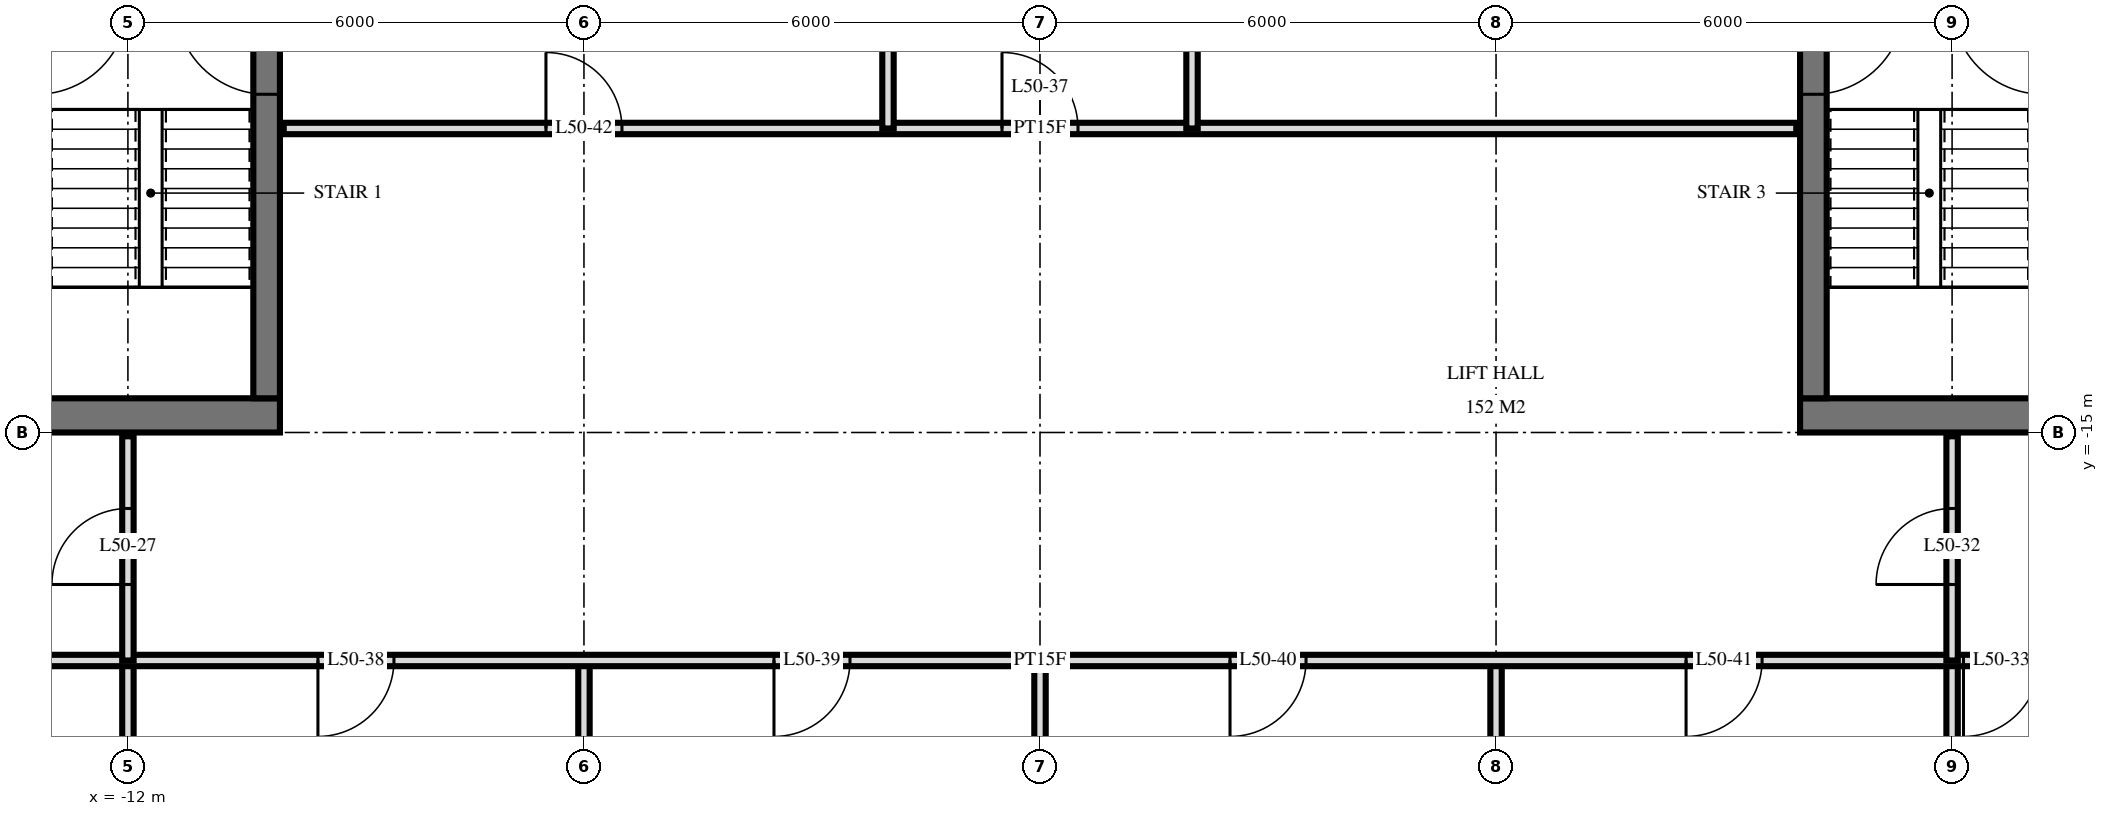
"""IFC4 building model, lengths in metres.
Left out: names, types, materials, properties, quantities, classifications, styles, units other than length and angle.
Written with IfcOpenShell. Run it as: python <this file> out.ifc"""

import sys

from ifc_helpers import new_model, si_unit, direction, frame, frame_2d, origin, place, context, subcontext, project, spatial, rectangle, extrude, element, fill, save


model = new_model("IFC4")
c1 = context("Model", 3, precision=1e-05, world=origin(), true_north=direction((0.0, 1.0)))
c2 = subcontext(c1, "Body", "Model", "MODEL_VIEW")
j1 = project(units=[si_unit("LENGTHUNIT", "METRE"), si_unit("PLANEANGLEUNIT", "RADIAN")], contexts=[c1])
p1 = place(None, origin())
s1 = spatial("IfcSite", under=j1, at=p1, CompositionType="ELEMENT")
p2 = place(p1, origin())
s2 = spatial("IfcBuilding", under=s1, at=p2, CompositionType="ELEMENT")
p3 = place(p2, frame((0.0, 0.0, 194.1)))
s3 = spatial("IfcBuildingStorey", under=s2, at=p3, CompositionType="ELEMENT", Elevation=194.1)
p4 = place(p3, frame((-24.5, -14.775, 0.0), z_axis=(0.0, 0.0, 1.0), x_axis=(1.0, 0.0, 0.0)))
e1 = element("IfcWall", 1, at=p4, inside=s3, PredefinedType="SHEAR", context=c2, shape_type="SweptSolid", body=[
    extrude(rectangle(XDim=14.5, YDim=0.45, at=frame_2d((7.25, 0.0))), origin(), (0.0, 0.0, 1.0), 3.5),
])
p5 = place(p4, frame((6.2, 0.0, 0.0)))
e2 = element("IfcOpeningElement", 2, at=p5, cuts=e1, PredefinedType="OPENING", context=c2, shape_type="SweptSolid", body=[
    extrude(rectangle(XDim=1.2, YDim=2.1, at=frame_2d((0.6, 1.05))), frame((0.0, 0.235, 0.0), z_axis=(0.0, -1.0, 0.0), x_axis=(1.0, 0.0, 0.0)), (0.0, 0.0, 1.0), 0.47),
])
p6 = place(p4, frame((9.25, 0.0, 0.0)))
e3 = element("IfcOpeningElement", 3, at=p6, cuts=e1, PredefinedType="OPENING", context=c2, shape_type="SweptSolid", body=[
    extrude(rectangle(XDim=1.1, YDim=2.1, at=frame_2d((0.55, 1.05))), frame((0.0, 0.235, 0.0), z_axis=(0.0, -1.0, 0.0), x_axis=(1.0, 0.0, 0.0)), (0.0, 0.0, 1.0), 0.47),
])
p7 = place(p4, frame((3.5, 0.0, 0.0)))
e4 = element("IfcOpeningElement", 4, at=p7, cuts=e1, PredefinedType="OPENING", context=c2, shape_type="SweptSolid", body=[
    extrude(rectangle(XDim=0.9, YDim=2.1, at=frame_2d((0.45, 1.05))), frame((0.0, 0.235, 0.0), z_axis=(0.0, -1.0, 0.0), x_axis=(1.0, 0.0, 0.0)), (0.0, 0.0, 1.0), 0.47),
])
p8 = place(p4, frame((1.05, 0.0, 0.0)))
e5 = element("IfcOpeningElement", 5, at=p8, cuts=e1, PredefinedType="OPENING", context=c2, shape_type="SweptSolid", body=[
    extrude(rectangle(XDim=1.0, YDim=2.1, at=frame_2d((0.5, 1.05))), frame((0.0, 0.235, 0.0), z_axis=(0.0, -1.0, 0.0), x_axis=(1.0, 0.0, 0.0)), (0.0, 0.0, 1.0), 0.47),
])
p9 = place(p3, frame((-10.175, -14.55, 0.0), z_axis=(0.0, 0.0, 1.0), x_axis=(0.0, 1.0, 0.0)))
e6 = element("IfcWall", 6, at=p9, inside=s3, PredefinedType="SHEAR", context=c2, shape_type="SweptSolid", body=[
    extrude(rectangle(XDim=14.1, YDim=0.35, at=frame_2d((7.05, 0.0))), origin(), (0.0, 0.0, 1.0), 3.5),
])
p10 = place(p9, frame((8.4, 0.0, 0.0)))
e7 = element("IfcOpeningElement", 7, at=p10, cuts=e6, PredefinedType="OPENING", context=c2, shape_type="SweptSolid", body=[
    extrude(rectangle(XDim=1.4, YDim=2.4, at=frame_2d((0.7, 1.2))), frame((0.0, 0.185, 0.0), z_axis=(0.0, -1.0, 0.0), x_axis=(1.0, 0.0, 0.0)), (0.0, 0.0, 1.0), 0.37),
])
p11 = place(p9, frame((10.0, 0.0, 0.0)))
e8 = element("IfcOpeningElement", 8, at=p11, cuts=e6, PredefinedType="OPENING", context=c2, shape_type="SweptSolid", body=[
    extrude(rectangle(XDim=1.4, YDim=2.4, at=frame_2d((0.7, 1.2))), frame((0.0, 0.185, 0.0), z_axis=(0.0, -1.0, 0.0), x_axis=(1.0, 0.0, 0.0)), (0.0, 0.0, 1.0), 0.37),
])
p12 = place(p9, frame((4.0, 0.0, 0.0)))
e9 = element("IfcOpeningElement", 9, at=p12, cuts=e6, PredefinedType="OPENING", context=c2, shape_type="SweptSolid", body=[
    extrude(rectangle(XDim=1.2, YDim=2.1, at=frame_2d((0.6, 1.05))), frame((0.0, 0.185, 0.0), z_axis=(0.0, -1.0, 0.0), x_axis=(1.0, 0.0, 0.0)), (0.0, 0.0, 1.0), 0.37),
])
p13 = place(p3, frame((10.0, -14.775, 0.0), z_axis=(0.0, 0.0, 1.0), x_axis=(1.0, 0.0, 0.0)))
e10 = element("IfcWall", 10, at=p13, inside=s3, PredefinedType="SHEAR", context=c2, shape_type="SweptSolid", body=[
    extrude(rectangle(XDim=14.5, YDim=0.45, at=frame_2d((7.25, 0.0))), origin(), (0.0, 0.0, 1.0), 3.5),
])
p14 = place(p13, frame((7.1, 0.0, 0.0)))
e11 = element("IfcOpeningElement", 11, at=p14, cuts=e10, PredefinedType="OPENING", context=c2, shape_type="SweptSolid", body=[
    extrude(rectangle(XDim=1.2, YDim=2.1, at=frame_2d((0.6, 1.05))), frame((0.0, 0.235, 0.0), z_axis=(0.0, -1.0, 0.0), x_axis=(1.0, 0.0, 0.0)), (0.0, 0.0, 1.0), 0.47),
])
p15 = place(p13, frame((4.15, 0.0, 0.0)))
e12 = element("IfcOpeningElement", 12, at=p15, cuts=e10, PredefinedType="OPENING", context=c2, shape_type="SweptSolid", body=[
    extrude(rectangle(XDim=1.1, YDim=2.1, at=frame_2d((0.55, 1.05))), frame((0.0, 0.235, 0.0), z_axis=(0.0, -1.0, 0.0), x_axis=(1.0, 0.0, 0.0)), (0.0, 0.0, 1.0), 0.47),
])
p16 = place(p13, frame((10.1, 0.0, 0.0)))
e13 = element("IfcOpeningElement", 13, at=p16, cuts=e10, PredefinedType="OPENING", context=c2, shape_type="SweptSolid", body=[
    extrude(rectangle(XDim=0.9, YDim=2.1, at=frame_2d((0.45, 1.05))), frame((0.0, 0.235, 0.0), z_axis=(0.0, -1.0, 0.0), x_axis=(1.0, 0.0, 0.0)), (0.0, 0.0, 1.0), 0.47),
])
p17 = place(p13, frame((12.45, 0.0, 0.0)))
e14 = element("IfcOpeningElement", 14, at=p17, cuts=e10, PredefinedType="OPENING", context=c2, shape_type="SweptSolid", body=[
    extrude(rectangle(XDim=1.0, YDim=2.1, at=frame_2d((0.5, 1.05))), frame((0.0, 0.235, 0.0), z_axis=(0.0, -1.0, 0.0), x_axis=(1.0, 0.0, 0.0)), (0.0, 0.0, 1.0), 0.47),
])
p18 = place(p3, frame((10.175, -14.55, 0.0), z_axis=(0.0, 0.0, 1.0), x_axis=(0.0, 1.0, 0.0)))
e15 = element("IfcWall", 15, at=p18, inside=s3, PredefinedType="SHEAR", context=c2, shape_type="SweptSolid", body=[
    extrude(rectangle(XDim=14.1, YDim=0.35, at=frame_2d((7.05, 0.0))), origin(), (0.0, 0.0, 1.0), 3.5),
])
p19 = place(p18, frame((8.4, 0.0, 0.0)))
e16 = element("IfcOpeningElement", 16, at=p19, cuts=e15, PredefinedType="OPENING", context=c2, shape_type="SweptSolid", body=[
    extrude(rectangle(XDim=1.4, YDim=2.4, at=frame_2d((0.7, 1.2))), frame((0.0, 0.185, 0.0), z_axis=(0.0, -1.0, 0.0), x_axis=(1.0, 0.0, 0.0)), (0.0, 0.0, 1.0), 0.37),
])
p20 = place(p18, frame((10.0, 0.0, 0.0)))
e17 = element("IfcOpeningElement", 17, at=p20, cuts=e15, PredefinedType="OPENING", context=c2, shape_type="SweptSolid", body=[
    extrude(rectangle(XDim=1.4, YDim=2.4, at=frame_2d((0.7, 1.2))), frame((0.0, 0.185, 0.0), z_axis=(0.0, -1.0, 0.0), x_axis=(1.0, 0.0, 0.0)), (0.0, 0.0, 1.0), 0.37),
])
p21 = place(p18, frame((4.0, 0.0, 0.0)))
e18 = element("IfcOpeningElement", 18, at=p21, cuts=e15, PredefinedType="OPENING", context=c2, shape_type="SweptSolid", body=[
    extrude(rectangle(XDim=1.2, YDim=2.1, at=frame_2d((0.6, 1.05))), frame((0.0, 0.185, 0.0), z_axis=(0.0, -1.0, 0.0), x_axis=(1.0, 0.0, 0.0)), (0.0, 0.0, 1.0), 0.37),
])
p22 = place(p3, frame((12.0, -18.0, 0.0), z_axis=(0.0, 0.0, 1.0), x_axis=(0.0, 1.0, 0.0)))
e19 = element("IfcWall", 19, at=p22, inside=s3, PredefinedType="PARTITIONING", context=c2, shape_type="SweptSolid", body=[
    extrude(rectangle(XDim=2.95, YDim=0.15, at=frame_2d((1.475, 0.0))), origin(), (0.0, 0.0, 1.0), 3.22),
])
p23 = place(p22, frame((1.0, 0.0, 0.0)))
e20 = element("IfcOpeningElement", 20, at=p23, cuts=e19, PredefinedType="OPENING", context=c2, shape_type="SweptSolid", body=[
    extrude(rectangle(XDim=1.0, YDim=2.1, at=frame_2d((0.5, 1.05))), frame((0.0, 0.085, 0.0), z_axis=(0.0, -1.0, 0.0), x_axis=(1.0, 0.0, 0.0)), (0.0, 0.0, 1.0), 0.17),
])
for number, where, z_axis, x_axis in (
    (21, (12.0, -29.22, 0.0), (0.0, 0.0, 1.0), (0.0, 1.0, 0.0)),
    (22, (6.0, -29.22, 0.0), (0.0, 0.0, 1.0), (0.0, 1.0, 0.0)),
):
    element("IfcWall", number, at=place(p3, frame(where, z_axis=z_axis, x_axis=x_axis)), inside=s3, PredefinedType="PARTITIONING", context=c2, shape_type="SweptSolid", body=[
        extrude(rectangle(XDim=11.22, YDim=0.15, at=frame_2d((5.61, 0.0))), origin(), (0.0, 0.0, 1.0), 3.22),
    ])
p24 = place(p3, frame((2.0, -11.0, 0.0), z_axis=(0.0, 0.0, 1.0), x_axis=(0.0, 1.0, 0.0)))
e23 = element("IfcWall", 23, at=p24, inside=s3, PredefinedType="PARTITIONING", context=c2, shape_type="SweptSolid", body=[
    extrude(rectangle(XDim=4.0, YDim=0.15, at=frame_2d((2.0, 0.0))), origin(), (0.0, 0.0, 1.0), 3.22),
])
p25 = place(p3, frame((0.0, -29.22, 0.0), z_axis=(0.0, 0.0, 1.0), x_axis=(0.0, 1.0, 0.0)))
e24 = element("IfcWall", 24, at=p25, inside=s3, PredefinedType="PARTITIONING", context=c2, shape_type="SweptSolid", body=[
    extrude(rectangle(XDim=11.22, YDim=0.15, at=frame_2d((5.61, 0.0))), origin(), (0.0, 0.0, 1.0), 3.22),
])
p26 = place(p3, frame((-2.0, -11.0, 0.0), z_axis=(0.0, 0.0, 1.0), x_axis=(0.0, 1.0, 0.0)))
e25 = element("IfcWall", 25, at=p26, inside=s3, PredefinedType="PARTITIONING", context=c2, shape_type="SweptSolid", body=[
    extrude(rectangle(XDim=4.0, YDim=0.15, at=frame_2d((2.0, 0.0))), origin(), (0.0, 0.0, 1.0), 3.22),
])
p27 = place(p3, frame((-6.0, -29.22, 0.0), z_axis=(0.0, 0.0, 1.0), x_axis=(0.0, 1.0, 0.0)))
e26 = element("IfcWall", 26, at=p27, inside=s3, PredefinedType="PARTITIONING", context=c2, shape_type="SweptSolid", body=[
    extrude(rectangle(XDim=11.22, YDim=0.15, at=frame_2d((5.61, 0.0))), origin(), (0.0, 0.0, 1.0), 3.22),
])
p28 = place(p3, frame((-12.0, -18.0, 0.0), z_axis=(0.0, 0.0, 1.0), x_axis=(0.0, 1.0, 0.0)))
e27 = element("IfcWall", 27, at=p28, inside=s3, PredefinedType="PARTITIONING", context=c2, shape_type="SweptSolid", body=[
    extrude(rectangle(XDim=2.95, YDim=0.15, at=frame_2d((1.475, 0.0))), origin(), (0.0, 0.0, 1.0), 3.22),
])
p29 = place(p28, frame((1.0, 0.0, 0.0)))
e28 = element("IfcOpeningElement", 28, at=p29, cuts=e27, PredefinedType="OPENING", context=c2, shape_type="SweptSolid", body=[
    extrude(rectangle(XDim=1.0, YDim=2.1, at=frame_2d((0.5, 1.05))), frame((0.0, 0.085, 0.0), z_axis=(0.0, -1.0, 0.0), x_axis=(1.0, 0.0, 0.0)), (0.0, 0.0, 1.0), 0.17),
])
p30 = place(p3, frame((-12.0, -29.22, 0.0), z_axis=(0.0, 0.0, 1.0), x_axis=(0.0, 1.0, 0.0)))
e29 = element("IfcWall", 29, at=p30, inside=s3, PredefinedType="PARTITIONING", context=c2, shape_type="SweptSolid", body=[
    extrude(rectangle(XDim=11.22, YDim=0.15, at=frame_2d((5.61, 0.0))), origin(), (0.0, 0.0, 1.0), 3.22),
])
p31 = place(p3, frame((-26.82, -18.0, 0.0), z_axis=(0.0, 0.0, 1.0), x_axis=(1.0, 0.0, 0.0)))
e30 = element("IfcWall", 30, at=p31, inside=s3, PredefinedType="PARTITIONING", context=c2, shape_type="SweptSolid", body=[
    extrude(rectangle(XDim=53.64, YDim=0.15, at=frame_2d((26.82, 0.0))), origin(), (0.0, 0.0, 1.0), 3.22),
])
p32 = place(p31, frame((11.32, 0.0, 0.0)))
e31 = element("IfcOpeningElement", 31, at=p32, cuts=e30, PredefinedType="OPENING", context=c2, shape_type="SweptSolid", body=[
    extrude(rectangle(XDim=1.0, YDim=2.1, at=frame_2d((0.5, 1.05))), frame((0.0, 0.085, 0.0), z_axis=(0.0, -1.0, 0.0), x_axis=(1.0, 0.0, 0.0)), (0.0, 0.0, 1.0), 0.17),
])
p33 = place(p31, frame((3.22, 0.0, 0.0)))
e32 = element("IfcOpeningElement", 32, at=p33, cuts=e30, PredefinedType="OPENING", context=c2, shape_type="SweptSolid", body=[
    extrude(rectangle(XDim=1.0, YDim=2.1, at=frame_2d((0.5, 1.05))), frame((0.0, 0.085, 0.0), z_axis=(0.0, -1.0, 0.0), x_axis=(1.0, 0.0, 0.0)), (0.0, 0.0, 1.0), 0.17),
])
p34 = place(p31, frame((5.02, 0.0, 0.0)))
e33 = element("IfcOpeningElement", 33, at=p34, cuts=e30, PredefinedType="OPENING", context=c2, shape_type="SweptSolid", body=[
    extrude(rectangle(XDim=1.0, YDim=2.1, at=frame_2d((0.5, 1.05))), frame((0.0, 0.085, 0.0), z_axis=(0.0, -1.0, 0.0), x_axis=(1.0, 0.0, 0.0)), (0.0, 0.0, 1.0), 0.17),
])
p35 = place(p31, frame((38.97, 0.0, 0.0)))
e34 = element("IfcOpeningElement", 34, at=p35, cuts=e30, PredefinedType="OPENING", context=c2, shape_type="SweptSolid", body=[
    extrude(rectangle(XDim=1.0, YDim=2.1, at=frame_2d((0.5, 1.05))), frame((0.0, 0.085, 0.0), z_axis=(0.0, -1.0, 0.0), x_axis=(1.0, 0.0, 0.0)), (0.0, 0.0, 1.0), 0.17),
])
p36 = place(p31, frame((48.72, 0.0, 0.0)))
e35 = element("IfcOpeningElement", 35, at=p36, cuts=e30, PredefinedType="OPENING", context=c2, shape_type="SweptSolid", body=[
    extrude(rectangle(XDim=1.0, YDim=2.1, at=frame_2d((0.5, 1.05))), frame((0.0, 0.085, 0.0), z_axis=(0.0, -1.0, 0.0), x_axis=(1.0, 0.0, 0.0)), (0.0, 0.0, 1.0), 0.17),
])
p37 = place(p31, frame((46.92, 0.0, 0.0)))
e36 = element("IfcOpeningElement", 36, at=p37, cuts=e30, PredefinedType="OPENING", context=c2, shape_type="SweptSolid", body=[
    extrude(rectangle(XDim=1.0, YDim=2.1, at=frame_2d((0.5, 1.05))), frame((0.0, 0.085, 0.0), z_axis=(0.0, -1.0, 0.0), x_axis=(1.0, 0.0, 0.0)), (0.0, 0.0, 1.0), 0.17),
])
p38 = place(p31, frame((17.32, 0.0, 0.0)))
e37 = element("IfcOpeningElement", 37, at=p38, cuts=e30, PredefinedType="OPENING", context=c2, shape_type="SweptSolid", body=[
    extrude(rectangle(XDim=1.0, YDim=2.1, at=frame_2d((0.5, 1.05))), frame((0.0, 0.085, 0.0), z_axis=(0.0, -1.0, 0.0), x_axis=(1.0, 0.0, 0.0)), (0.0, 0.0, 1.0), 0.17),
])
p39 = place(p31, frame((23.32, 0.0, 0.0)))
e38 = element("IfcOpeningElement", 38, at=p39, cuts=e30, PredefinedType="OPENING", context=c2, shape_type="SweptSolid", body=[
    extrude(rectangle(XDim=1.0, YDim=2.1, at=frame_2d((0.5, 1.05))), frame((0.0, 0.085, 0.0), z_axis=(0.0, -1.0, 0.0), x_axis=(1.0, 0.0, 0.0)), (0.0, 0.0, 1.0), 0.17),
])
p40 = place(p31, frame((29.32, 0.0, 0.0)))
e39 = element("IfcOpeningElement", 39, at=p40, cuts=e30, PredefinedType="OPENING", context=c2, shape_type="SweptSolid", body=[
    extrude(rectangle(XDim=1.0, YDim=2.1, at=frame_2d((0.5, 1.05))), frame((0.0, 0.085, 0.0), z_axis=(0.0, -1.0, 0.0), x_axis=(1.0, 0.0, 0.0)), (0.0, 0.0, 1.0), 0.17),
])
p41 = place(p31, frame((35.32, 0.0, 0.0)))
e40 = element("IfcOpeningElement", 40, at=p41, cuts=e30, PredefinedType="OPENING", context=c2, shape_type="SweptSolid", body=[
    extrude(rectangle(XDim=1.0, YDim=2.1, at=frame_2d((0.5, 1.05))), frame((0.0, 0.085, 0.0), z_axis=(0.0, -1.0, 0.0), x_axis=(1.0, 0.0, 0.0)), (0.0, 0.0, 1.0), 0.17),
])
p42 = place(p3, frame((-9.95, -11.0, 0.0), z_axis=(0.0, 0.0, 1.0), x_axis=(1.0, 0.0, 0.0)))
e41 = element("IfcWall", 41, at=p42, inside=s3, PredefinedType="PARTITIONING", context=c2, shape_type="SweptSolid", body=[
    extrude(rectangle(XDim=19.9, YDim=0.15, at=frame_2d((9.95, 0.0))), origin(), (0.0, 0.0, 1.0), 3.22),
])
p43 = place(p42, frame((9.45, 0.0, 0.0)))
e42 = element("IfcOpeningElement", 42, at=p43, cuts=e41, PredefinedType="OPENING", context=c2, shape_type="SweptSolid", body=[
    extrude(rectangle(XDim=1.0, YDim=2.1, at=frame_2d((0.5, 1.05))), frame((0.0, 0.085, 0.0), z_axis=(0.0, -1.0, 0.0), x_axis=(1.0, 0.0, 0.0)), (0.0, 0.0, 1.0), 0.17),
])
p44 = place(p42, frame((3.45, 0.0, 0.0)))
e43 = element("IfcOpeningElement", 43, at=p44, cuts=e41, PredefinedType="OPENING", context=c2, shape_type="SweptSolid", body=[
    extrude(rectangle(XDim=1.0, YDim=2.1, at=frame_2d((0.5, 1.05))), frame((0.0, 0.085, 0.0), z_axis=(0.0, -1.0, 0.0), x_axis=(1.0, 0.0, 0.0)), (0.0, 0.0, 1.0), 0.17),
])
p45 = place(p12, origin())
e44 = element("IfcDoor", 44, at=p45, inside=s3, OperationType="SINGLE_SWING_LEFT", PredefinedType="DOOR", context=c2, shape_type="SweptSolid", body=[
    extrude(rectangle(XDim=1.2, YDim=2.1, at=frame_2d((0.6, 1.05))), frame((0.0, 0.025, 0.0), z_axis=(0.0, -1.0, 0.0), x_axis=(1.0, 0.0, 0.0)), (0.0, 0.0, 1.0), 0.05),
])
fill(e9, e44)
p46 = place(p21, frame((0.6, 0.0, 0.0), z_axis=(0.0, 0.0, 1.0), x_axis=(-1.0, 0.0, 0.0)))
e45 = element("IfcDoor", 45, at=p46, inside=s3, OperationType="SINGLE_SWING_RIGHT", PredefinedType="DOOR", context=c2, shape_type="SweptSolid", body=[
    extrude(rectangle(XDim=1.2, YDim=2.1, at=frame_2d((0.0, 1.05))), frame((0.0, -0.025, 0.0), z_axis=(0.0, 1.0, 0.0), x_axis=(-1.0, 0.0, 0.0)), (0.0, 0.0, 1.0), 0.05),
])
fill(e18, e45)
p47 = place(p29, origin())
e46 = element("IfcDoor", 46, at=p47, inside=s3, OperationType="SINGLE_SWING_RIGHT", PredefinedType="DOOR", context=c2, shape_type="SweptSolid", body=[
    extrude(rectangle(XDim=1.0, YDim=2.1, at=frame_2d((0.5, 1.05))), frame((0.0, 0.025, 0.0), z_axis=(0.0, -1.0, 0.0), x_axis=(1.0, 0.0, 0.0)), (0.0, 0.0, 1.0), 0.05),
])
fill(e28, e46)
p48 = place(p23, origin())
e47 = element("IfcDoor", 47, at=p48, inside=s3, OperationType="SINGLE_SWING_RIGHT", PredefinedType="DOOR", context=c2, shape_type="SweptSolid", body=[
    extrude(rectangle(XDim=1.0, YDim=2.1, at=frame_2d((0.5, 1.05))), frame((0.0, 0.025, 0.0), z_axis=(0.0, -1.0, 0.0), x_axis=(1.0, 0.0, 0.0)), (0.0, 0.0, 1.0), 0.05),
])
fill(e20, e47)
p49 = place(p35, frame((0.5, 0.0, 0.0), z_axis=(0.0, 0.0, 1.0), x_axis=(-1.0, 0.0, 0.0)))
e48 = element("IfcDoor", 48, at=p49, inside=s3, OperationType="SINGLE_SWING_LEFT", PredefinedType="DOOR", context=c2, shape_type="SweptSolid", body=[
    extrude(rectangle(XDim=1.0, YDim=2.1, at=frame_2d((0.0, 1.05))), frame((0.0, -0.025, 0.0), z_axis=(0.0, 1.0, 0.0), x_axis=(-1.0, 0.0, 0.0)), (0.0, 0.0, 1.0), 0.05),
])
fill(e34, e48)
p50 = place(p43, origin())
e49 = element("IfcDoor", 49, at=p50, inside=s3, OperationType="SINGLE_SWING_RIGHT", PredefinedType="DOOR", context=c2, shape_type="SweptSolid", body=[
    extrude(rectangle(XDim=1.0, YDim=2.1, at=frame_2d((0.5, 1.05))), frame((0.0, 0.025, 0.0), z_axis=(0.0, -1.0, 0.0), x_axis=(1.0, 0.0, 0.0)), (0.0, 0.0, 1.0), 0.05),
])
fill(e42, e49)
p51 = place(p38, frame((0.5, 0.0, 0.0), z_axis=(0.0, 0.0, 1.0), x_axis=(-1.0, 0.0, 0.0)))
e50 = element("IfcDoor", 50, at=p51, inside=s3, OperationType="SINGLE_SWING_LEFT", PredefinedType="DOOR", context=c2, shape_type="SweptSolid", body=[
    extrude(rectangle(XDim=1.0, YDim=2.1, at=frame_2d((0.0, 1.05))), frame((0.0, -0.025, 0.0), z_axis=(0.0, 1.0, 0.0), x_axis=(-1.0, 0.0, 0.0)), (0.0, 0.0, 1.0), 0.05),
])
fill(e37, e50)
p52 = place(p39, frame((0.5, 0.0, 0.0), z_axis=(0.0, 0.0, 1.0), x_axis=(-1.0, 0.0, 0.0)))
e51 = element("IfcDoor", 51, at=p52, inside=s3, OperationType="SINGLE_SWING_LEFT", PredefinedType="DOOR", context=c2, shape_type="SweptSolid", body=[
    extrude(rectangle(XDim=1.0, YDim=2.1, at=frame_2d((0.0, 1.05))), frame((0.0, -0.025, 0.0), z_axis=(0.0, 1.0, 0.0), x_axis=(-1.0, 0.0, 0.0)), (0.0, 0.0, 1.0), 0.05),
])
fill(e38, e51)
p53 = place(p40, frame((0.5, 0.0, 0.0), z_axis=(0.0, 0.0, 1.0), x_axis=(-1.0, 0.0, 0.0)))
e52 = element("IfcDoor", 52, at=p53, inside=s3, OperationType="SINGLE_SWING_LEFT", PredefinedType="DOOR", context=c2, shape_type="SweptSolid", body=[
    extrude(rectangle(XDim=1.0, YDim=2.1, at=frame_2d((0.0, 1.05))), frame((0.0, -0.025, 0.0), z_axis=(0.0, 1.0, 0.0), x_axis=(-1.0, 0.0, 0.0)), (0.0, 0.0, 1.0), 0.05),
])
fill(e39, e52)
p54 = place(p41, frame((0.5, 0.0, 0.0), z_axis=(0.0, 0.0, 1.0), x_axis=(-1.0, 0.0, 0.0)))
e53 = element("IfcDoor", 53, at=p54, inside=s3, OperationType="SINGLE_SWING_LEFT", PredefinedType="DOOR", context=c2, shape_type="SweptSolid", body=[
    extrude(rectangle(XDim=1.0, YDim=2.1, at=frame_2d((0.0, 1.05))), frame((0.0, -0.025, 0.0), z_axis=(0.0, 1.0, 0.0), x_axis=(-1.0, 0.0, 0.0)), (0.0, 0.0, 1.0), 0.05),
])
fill(e40, e53)
p55 = place(p44, origin())
e54 = element("IfcDoor", 54, at=p55, inside=s3, OperationType="SINGLE_SWING_RIGHT", PredefinedType="DOOR", context=c2, shape_type="SweptSolid", body=[
    extrude(rectangle(XDim=1.0, YDim=2.1, at=frame_2d((0.5, 1.05))), frame((0.0, 0.025, 0.0), z_axis=(0.0, -1.0, 0.0), x_axis=(1.0, 0.0, 0.0)), (0.0, 0.0, 1.0), 0.05),
])
fill(e43, e54)
save(model, sys.argv[1])
